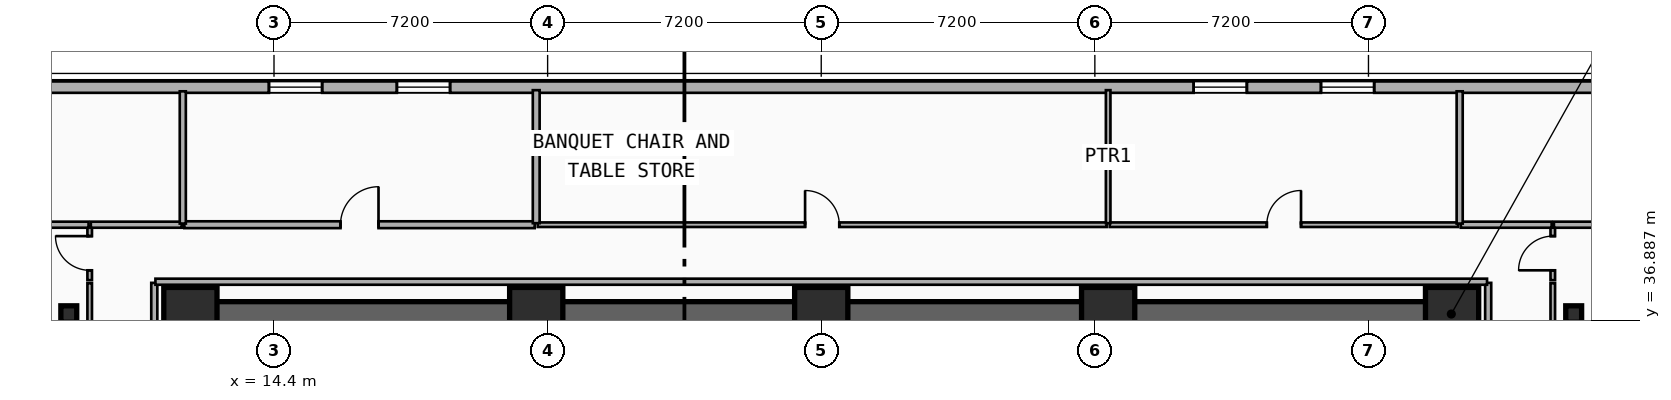
"""IFC4 building model, lengths in metres.
Left out: names, types, materials, properties, quantities, classifications, styles, units other than length and angle.
Written with IfcOpenShell. Run it as: python <this file> out.ifc"""

import sys

from ifc_helpers import new_model, si_unit, direction, frame, frame_2d, origin, origin_2d, place, context, subcontext, project, spatial, rectangle, i_section, extrude, element, fill, save


model = new_model("IFC4")
c1 = context("Model", 3, precision=1e-05, world=origin(), true_north=direction((0.0, 1.0)))
c2 = subcontext(c1, "Body", "Model", "MODEL_VIEW")
j1 = project(units=[si_unit("LENGTHUNIT", "METRE"), si_unit("PLANEANGLEUNIT", "RADIAN")], contexts=[c1])
p1 = place(None, origin())
s1 = spatial("IfcSite", under=j1, at=p1, CompositionType="ELEMENT")
p2 = place(p1, origin())
s2 = spatial("IfcBuilding", under=s1, at=p2, CompositionType="ELEMENT")
p3 = place(p2, frame((0.0, 0.0, 89.8)))
s3 = spatial("IfcBuildingStorey", under=s2, at=p3, CompositionType="ELEMENT", Elevation=89.8)
p4 = place(p3, frame((12.15, 37.05, 0.0), z_axis=(0.0, 0.0, 1.0), x_axis=(1.0, 0.0, 0.0)))
e1 = element("IfcWall", 1, at=p4, inside=s3, PredefinedType="SHEAR", context=c2, shape_type="SweptSolid", body=[
    extrude(rectangle(XDim=33.23, YDim=0.65, at=frame_2d((16.615, 0.0))), origin(), (0.0, 0.0, 1.0), 4.5),
])
for number, where, z_axis, x_axis in (
    (2, (12.2, 37.05, 0.0), (0.0, 0.0, 1.0), (1.0, 0.0, 0.0)),
    (3, (21.3, 37.05, 0.0), (0.0, 0.0, 1.0), (1.0, 0.0, 0.0)),
    (4, (28.8, 37.05, 0.0), (0.0, 0.0, 1.0), (1.0, 0.0, 0.0)),
    (5, (36.35, 37.05, 0.0), (0.0, 0.0, 1.0), (1.0, 0.0, 0.0)),
    (6, (45.4, 37.05, 0.0), (0.0, 0.0, 1.0), (1.0, 0.0, 0.0)),
):
    element("IfcColumn", number, at=place(p3, frame(where, z_axis=z_axis, x_axis=x_axis)), inside=s3, PredefinedType="COLUMN", context=c2, shape_type="SweptSolid", body=[
        extrude(rectangle(XDim=1.4, YDim=1.4, at=origin_2d()), origin(), (0.0, 0.0, 1.0), 4.5),
    ])
for number, where, z_axis, x_axis in (
    (7, (9.0, 37.05, 0.0), (0.0, 0.0, 1.0), (1.0, 0.0, 0.0)),
    (8, (48.6, 37.05, 0.0), (0.0, 0.0, 1.0), (1.0, 0.0, 0.0)),
):
    element("IfcColumn", number, at=place(p3, frame(where, z_axis=z_axis, x_axis=x_axis)), inside=s3, PredefinedType="COLUMN", context=c2, shape_type="SweptSolid", body=[
        extrude(i_section(OverallWidth=0.418, OverallDepth=0.432, WebThickness=0.035, FlangeThickness=0.056, FilletRadius=0.015, at=origin_2d()), origin(), (0.0, 0.0, 1.0), 4.5),
    ])
p5 = place(p3, frame((4.2, 43.02, 0.0), z_axis=(0.0, 0.0, 1.0), x_axis=(1.0, 0.0, 0.0)))
e9 = element("IfcWall", 9, at=p5, inside=s3, PredefinedType="SOLIDWALL", context=c2, shape_type="SweptSolid", body=[
    extrude(rectangle(XDim=49.2, YDim=0.3, at=frame_2d((24.6, 0.0))), origin(), (0.0, 0.0, 1.0), 4.24),
])
p6 = place(p5, frame((10.067, 0.0, 0.85)))
e10 = element("IfcOpeningElement", 10, at=p6, cuts=e9, PredefinedType="OPENING", context=c2, shape_type="SweptSolid", body=[
    extrude(rectangle(XDim=1.4, YDim=1.8, at=frame_2d((0.7, 0.9))), frame((0.0, 0.16, 0.0), z_axis=(0.0, -1.0, 0.0), x_axis=(1.0, 0.0, 0.0)), (0.0, 0.0, 1.0), 0.32),
])
p7 = place(p5, frame((13.433, 0.0, 0.85)))
e11 = element("IfcOpeningElement", 11, at=p7, cuts=e9, PredefinedType="OPENING", context=c2, shape_type="SweptSolid", body=[
    extrude(rectangle(XDim=1.4, YDim=1.8, at=frame_2d((0.7, 0.9))), frame((0.0, 0.16, 0.0), z_axis=(0.0, -1.0, 0.0), x_axis=(1.0, 0.0, 0.0)), (0.0, 0.0, 1.0), 0.32),
])
p8 = place(p5, frame((34.4, 0.0, 0.85)))
e12 = element("IfcOpeningElement", 12, at=p8, cuts=e9, PredefinedType="OPENING", context=c2, shape_type="SweptSolid", body=[
    extrude(rectangle(XDim=1.4, YDim=1.8, at=frame_2d((0.7, 0.9))), frame((0.0, 0.16, 0.0), z_axis=(0.0, -1.0, 0.0), x_axis=(1.0, 0.0, 0.0)), (0.0, 0.0, 1.0), 0.32),
])
p9 = place(p5, frame((37.75, 0.0, 0.85)))
e13 = element("IfcOpeningElement", 13, at=p9, cuts=e9, PredefinedType="OPENING", context=c2, shape_type="SweptSolid", body=[
    extrude(rectangle(XDim=1.4, YDim=1.8, at=frame_2d((0.7, 0.9))), frame((0.0, 0.16, 0.0), z_axis=(0.0, -1.0, 0.0), x_axis=(1.0, 0.0, 0.0)), (0.0, 0.0, 1.0), 0.32),
])
p10 = place(p3, frame((9.55, 27.64, 0.0), z_axis=(0.0, 0.0, 1.0), x_axis=(0.0, 1.0, 0.0)))
e14 = element("IfcWall", 14, at=p10, inside=s3, PredefinedType="PARTITIONING", context=c2, shape_type="SweptSolid", body=[
    extrude(rectangle(XDim=10.22, YDim=0.12, at=frame_2d((5.11, 0.0))), origin(), (0.0, 0.0, 1.0), 3.72),
])
p11 = place(p10, frame((4.66, 0.0, 0.0)))
e15 = element("IfcOpeningElement", 15, at=p11, cuts=e14, PredefinedType="OPENING", context=c2, shape_type="SweptSolid", body=[
    extrude(rectangle(XDim=0.9, YDim=2.1, at=frame_2d((0.45, 1.05))), frame((0.0, 0.07, 0.0), z_axis=(0.0, -1.0, 0.0), x_axis=(1.0, 0.0, 0.0)), (0.0, 0.0, 1.0), 0.14),
])
p12 = place(p3, frame((48.05, 27.64, 0.0), z_axis=(0.0, 0.0, 1.0), x_axis=(0.0, 1.0, 0.0)))
e16 = element("IfcWall", 16, at=p12, inside=s3, PredefinedType="PARTITIONING", context=c2, shape_type="SweptSolid", body=[
    extrude(rectangle(XDim=10.22, YDim=0.12, at=frame_2d((5.11, 0.0))), origin(), (0.0, 0.0, 1.0), 3.72),
])
p13 = place(p12, frame((4.66, 0.0, 0.0)))
e17 = element("IfcOpeningElement", 17, at=p13, cuts=e16, PredefinedType="OPENING", context=c2, shape_type="SweptSolid", body=[
    extrude(rectangle(XDim=0.9, YDim=2.1, at=frame_2d((0.45, 1.05))), frame((0.0, 0.07, 0.0), z_axis=(0.0, -1.0, 0.0), x_axis=(1.0, 0.0, 0.0)), (0.0, 0.0, 1.0), 0.14),
])
p14 = place(p3, frame((9.55, 37.94, 0.0), z_axis=(0.0, 0.0, 1.0), x_axis=(0.0, 1.0, 0.0)))
e18 = element("IfcWall", 18, at=p14, inside=s3, PredefinedType="PARTITIONING", context=c2, shape_type="SweptSolid", body=[
    extrude(rectangle(XDim=1.42, YDim=0.12, at=frame_2d((0.71, 0.0))), origin(), (0.0, 0.0, 1.0), 4.24),
])
p15 = place(p14, frame((0.26, 0.0, 0.0)))
e19 = element("IfcOpeningElement", 19, at=p15, cuts=e18, PredefinedType="OPENING", context=c2, shape_type="SweptSolid", body=[
    extrude(rectangle(XDim=0.9, YDim=2.1, at=frame_2d((0.45, 1.05))), frame((0.0, 0.07, 0.0), z_axis=(0.0, -1.0, 0.0), x_axis=(1.0, 0.0, 0.0)), (0.0, 0.0, 1.0), 0.14),
])
p16 = place(p3, frame((48.05, 37.94, 0.0), z_axis=(0.0, 0.0, 1.0), x_axis=(0.0, 1.0, 0.0)))
e20 = element("IfcWall", 20, at=p16, inside=s3, PredefinedType="PARTITIONING", context=c2, shape_type="SweptSolid", body=[
    extrude(rectangle(XDim=1.42, YDim=0.12, at=frame_2d((0.71, 0.0))), origin(), (0.0, 0.0, 1.0), 4.24),
])
p17 = place(p16, frame((0.26, 0.0, 0.0)))
e21 = element("IfcOpeningElement", 21, at=p17, cuts=e20, PredefinedType="OPENING", context=c2, shape_type="SweptSolid", body=[
    extrude(rectangle(XDim=0.9, YDim=2.1, at=frame_2d((0.45, 1.05))), frame((0.0, 0.07, 0.0), z_axis=(0.0, -1.0, 0.0), x_axis=(1.0, 0.0, 0.0)), (0.0, 0.0, 1.0), 0.14),
])
p18 = place(p3, frame((12.04, 39.4, 0.0), z_axis=(0.0, 0.0, 1.0), x_axis=(1.0, 0.0, 0.0)))
e22 = element("IfcWall", 22, at=p18, inside=s3, PredefinedType="PLUMBINGWALL", context=c2, shape_type="SweptSolid", body=[
    extrude(rectangle(XDim=9.22, YDim=0.18, at=frame_2d((4.61, 0.0))), origin(), (0.0, 0.0, 1.0), 4.24),
])
p19 = place(p18, frame((4.11, 0.0, 0.0)))
e23 = element("IfcOpeningElement", 23, at=p19, cuts=e22, PredefinedType="OPENING", context=c2, shape_type="SweptSolid", body=[
    extrude(rectangle(XDim=1.0, YDim=2.15, at=frame_2d((0.5, 1.075))), frame((0.0, 0.1, 0.0), z_axis=(0.0, -1.0, 0.0), x_axis=(1.0, 0.0, 0.0)), (0.0, 0.0, 1.0), 0.2),
])
p20 = place(p3, frame((21.34, 39.4, 0.0), z_axis=(0.0, 0.0, 1.0), x_axis=(1.0, 0.0, 0.0)))
e24 = element("IfcWall", 24, at=p20, inside=s3, PredefinedType="PARTITIONING", context=c2, shape_type="SweptSolid", body=[
    extrude(rectangle(XDim=14.97, YDim=0.12, at=frame_2d((7.485, 0.0))), origin(), (0.0, 0.0, 1.0), 4.24),
])
p21 = place(p20, frame((7.035, 0.0, 0.0)))
e25 = element("IfcOpeningElement", 25, at=p21, cuts=e24, PredefinedType="OPENING", context=c2, shape_type="SweptSolid", body=[
    extrude(rectangle(XDim=0.9, YDim=2.1, at=frame_2d((0.45, 1.05))), frame((0.0, 0.07, 0.0), z_axis=(0.0, -1.0, 0.0), x_axis=(1.0, 0.0, 0.0)), (0.0, 0.0, 1.0), 0.14),
])
p22 = place(p3, frame((36.39, 39.4, 0.0), z_axis=(0.0, 0.0, 1.0), x_axis=(1.0, 0.0, 0.0)))
e26 = element("IfcWall", 26, at=p22, inside=s3, PredefinedType="PARTITIONING", context=c2, shape_type="SweptSolid", body=[
    extrude(rectangle(XDim=9.17, YDim=0.12, at=frame_2d((4.585, 0.0))), origin(), (0.0, 0.0, 1.0), 4.24),
])
p23 = place(p22, frame((4.135, 0.0, 0.0)))
e27 = element("IfcOpeningElement", 27, at=p23, cuts=e26, PredefinedType="OPENING", context=c2, shape_type="SweptSolid", body=[
    extrude(rectangle(XDim=0.9, YDim=2.1, at=frame_2d((0.45, 1.05))), frame((0.0, 0.07, 0.0), z_axis=(0.0, -1.0, 0.0), x_axis=(1.0, 0.0, 0.0)), (0.0, 0.0, 1.0), 0.14),
])
p24 = place(p3, frame((21.3, 39.44, 0.0), z_axis=(0.0, 0.0, 1.0), x_axis=(0.0, 1.0, 0.0)))
e28 = element("IfcWall", 28, at=p24, inside=s3, PredefinedType="PLUMBINGWALL", context=c2, shape_type="SweptSolid", body=[
    extrude(rectangle(XDim=3.5, YDim=0.18, at=frame_2d((1.75, 0.0))), origin(), (0.0, 0.0, 1.0), 4.24),
])
p25 = place(p3, frame((36.35, 39.44, 0.0), z_axis=(0.0, 0.0, 1.0), x_axis=(0.0, 1.0, 0.0)))
e29 = element("IfcWall", 29, at=p25, inside=s3, PredefinedType="PARTITIONING", context=c2, shape_type="SweptSolid", body=[
    extrude(rectangle(XDim=3.5, YDim=0.12, at=frame_2d((1.75, 0.0))), origin(), (0.0, 0.0, 1.0), 4.24),
])
for number, where, z_axis, x_axis in (
    (30, (11.25, 27.63, 0.0), (0.0, 0.0, 1.0), (0.0, 1.0, 0.0)),
    (31, (46.35, 27.63, 0.0), (0.0, 0.0, 1.0), (0.0, 1.0, 0.0)),
):
    element("IfcWall", number, at=place(p3, frame(where, z_axis=z_axis, x_axis=x_axis)), inside=s3, PredefinedType="PARTITIONING", context=c2, shape_type="SweptSolid", body=[
        extrude(rectangle(XDim=10.24, YDim=0.16, at=frame_2d((5.12, 0.0))), origin(), (0.0, 0.0, 1.0), 3.72),
    ])
p26 = place(p3, frame((11.28, 37.9, 0.0), z_axis=(0.0, 0.0, 1.0), x_axis=(1.0, 0.0, 0.0)))
e32 = element("IfcWall", 32, at=p26, inside=s3, PredefinedType="PARTITIONING", context=c2, shape_type="SweptSolid", body=[
    extrude(rectangle(XDim=35.04, YDim=0.16, at=frame_2d((17.52, 0.0))), origin(), (0.0, 0.0, 1.0), 4.24),
])
p27 = place(p3, frame((9.58, 39.4, 0.0), z_axis=(0.0, 0.0, 1.0), x_axis=(1.0, 0.0, 0.0)))
e33 = element("IfcWall", 33, at=p27, inside=s3, PredefinedType="PARTITIONING", context=c2, shape_type="SweptSolid", body=[
    extrude(rectangle(XDim=2.39, YDim=0.16, at=frame_2d((1.195, 0.0))), origin(), (0.0, 0.0, 1.0), 4.24),
])
p28 = place(p3, frame((45.63, 39.4, 0.0), z_axis=(0.0, 0.0, 1.0), x_axis=(1.0, 0.0, 0.0)))
e34 = element("IfcWall", 34, at=p28, inside=s3, PredefinedType="PARTITIONING", context=c2, shape_type="SweptSolid", body=[
    extrude(rectangle(XDim=2.39, YDim=0.16, at=frame_2d((1.195, 0.0))), origin(), (0.0, 0.0, 1.0), 4.24),
])
for number, where, z_axis, x_axis in (
    (35, (0.29, 39.4, 0.0), (0.0, 0.0, 1.0), (1.0, 0.0, 0.0)),
    (36, (48.08, 39.4, 0.0), (0.0, 0.0, 1.0), (1.0, 0.0, 0.0)),
):
    element("IfcWall", number, at=place(p3, frame(where, z_axis=z_axis, x_axis=x_axis)), inside=s3, PredefinedType="PARTITIONING", context=c2, shape_type="SweptSolid", body=[
        extrude(rectangle(XDim=9.23, YDim=0.16, at=frame_2d((4.615, 0.0))), origin(), (0.0, 0.0, 1.0), 4.24),
    ])
for number, where, z_axis, x_axis in (
    (37, (12.0, 39.43, 0.0), (0.0, 0.0, 1.0), (0.0, 1.0, 0.0)),
    (38, (45.6, 39.43, 0.0), (0.0, 0.0, 1.0), (0.0, 1.0, 0.0)),
):
    element("IfcWall", number, at=place(p3, frame(where, z_axis=z_axis, x_axis=x_axis)), inside=s3, PredefinedType="PARTITIONING", context=c2, shape_type="SweptSolid", body=[
        extrude(rectangle(XDim=3.48, YDim=0.16, at=frame_2d((1.74, 0.0))), origin(), (0.0, 0.0, 1.0), 4.24),
    ])
p29 = place(p6, origin())
e39 = element("IfcWindow", 39, at=p29, inside=s3, PartitioningType="SINGLE_PANEL", PredefinedType="WINDOW", context=c2, shape_type="SweptSolid", body=[
    extrude(rectangle(XDim=1.4, YDim=1.8, at=frame_2d((0.7, 0.9))), frame((0.0, 0.03, 0.0), z_axis=(0.0, -1.0, 0.0), x_axis=(1.0, 0.0, 0.0)), (0.0, 0.0, 1.0), 0.06),
])
fill(e10, e39)
p30 = place(p7, origin())
e40 = element("IfcWindow", 40, at=p30, inside=s3, PartitioningType="SINGLE_PANEL", PredefinedType="WINDOW", context=c2, shape_type="SweptSolid", body=[
    extrude(rectangle(XDim=1.4, YDim=1.8, at=frame_2d((0.7, 0.9))), frame((0.0, 0.03, 0.0), z_axis=(0.0, -1.0, 0.0), x_axis=(1.0, 0.0, 0.0)), (0.0, 0.0, 1.0), 0.06),
])
fill(e11, e40)
p31 = place(p8, origin())
e41 = element("IfcWindow", 41, at=p31, inside=s3, PartitioningType="SINGLE_PANEL", PredefinedType="WINDOW", context=c2, shape_type="SweptSolid", body=[
    extrude(rectangle(XDim=1.4, YDim=1.8, at=frame_2d((0.7, 0.9))), frame((0.0, 0.03, 0.0), z_axis=(0.0, -1.0, 0.0), x_axis=(1.0, 0.0, 0.0)), (0.0, 0.0, 1.0), 0.06),
])
fill(e12, e41)
p32 = place(p9, origin())
e42 = element("IfcWindow", 42, at=p32, inside=s3, PartitioningType="SINGLE_PANEL", PredefinedType="WINDOW", context=c2, shape_type="SweptSolid", body=[
    extrude(rectangle(XDim=1.4, YDim=1.8, at=frame_2d((0.7, 0.9))), frame((0.0, 0.03, 0.0), z_axis=(0.0, -1.0, 0.0), x_axis=(1.0, 0.0, 0.0)), (0.0, 0.0, 1.0), 0.06),
])
fill(e13, e42)
p33 = place(p15, origin())
e43 = element("IfcDoor", 43, at=p33, inside=s3, OperationType="SINGLE_SWING_RIGHT", PredefinedType="DOOR", context=c2, shape_type="SweptSolid", body=[
    extrude(rectangle(XDim=0.9, YDim=2.1, at=frame_2d((0.45, 1.05))), frame((0.0, 0.025, 0.0), z_axis=(0.0, -1.0, 0.0), x_axis=(1.0, 0.0, 0.0)), (0.0, 0.0, 1.0), 0.05),
])
fill(e19, e43)
p34 = place(p17, origin())
e44 = element("IfcDoor", 44, at=p34, inside=s3, OperationType="SINGLE_SWING_LEFT", PredefinedType="DOOR", context=c2, shape_type="SweptSolid", body=[
    extrude(rectangle(XDim=0.9, YDim=2.1, at=frame_2d((0.45, 1.05))), frame((0.0, 0.025, 0.0), z_axis=(0.0, -1.0, 0.0), x_axis=(1.0, 0.0, 0.0)), (0.0, 0.0, 1.0), 0.05),
])
fill(e21, e44)
p35 = place(p19, origin())
e45 = element("IfcDoor", 45, at=p35, inside=s3, OperationType="SINGLE_SWING_RIGHT", PredefinedType="DOOR", context=c2, shape_type="SweptSolid", body=[
    extrude(rectangle(XDim=1.0, YDim=2.15, at=frame_2d((0.5, 1.075))), frame((0.0, 0.025, 0.0), z_axis=(0.0, -1.0, 0.0), x_axis=(1.0, 0.0, 0.0)), (0.0, 0.0, 1.0), 0.05),
])
fill(e23, e45)
p36 = place(p21, origin())
e46 = element("IfcDoor", 46, at=p36, inside=s3, OperationType="SINGLE_SWING_LEFT", PredefinedType="DOOR", context=c2, shape_type="SweptSolid", body=[
    extrude(rectangle(XDim=0.9, YDim=2.1, at=frame_2d((0.45, 1.05))), frame((0.0, 0.025, 0.0), z_axis=(0.0, -1.0, 0.0), x_axis=(1.0, 0.0, 0.0)), (0.0, 0.0, 1.0), 0.05),
])
fill(e25, e46)
p37 = place(p23, origin())
e47 = element("IfcDoor", 47, at=p37, inside=s3, OperationType="SINGLE_SWING_RIGHT", PredefinedType="DOOR", context=c2, shape_type="SweptSolid", body=[
    extrude(rectangle(XDim=0.9, YDim=2.1, at=frame_2d((0.45, 1.05))), frame((0.0, 0.025, 0.0), z_axis=(0.0, -1.0, 0.0), x_axis=(1.0, 0.0, 0.0)), (0.0, 0.0, 1.0), 0.05),
])
fill(e27, e47)
save(model, sys.argv[1])
